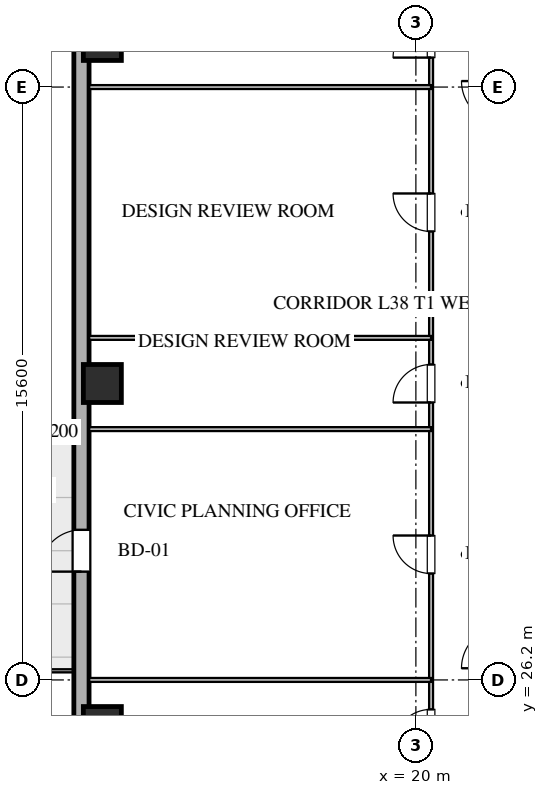
"""IFC4 building model, lengths in metres.
Left out: names, types, materials, properties, quantities, classifications, styles, units other than length and angle.
Written with IfcOpenShell. Run it as: python <this file> out.ifc"""

import sys

from ifc_helpers import new_model, si_unit, direction, frame, frame_2d, origin, origin_2d, place, context, subcontext, project, spatial, rectangle, hollow_rectangle, extrude, element, fill, save


model = new_model("IFC4")
c1 = context("Model", 3, precision=1e-05, world=origin(), true_north=direction((0.0, 1.0)))
c2 = subcontext(c1, "Body", "Model", "MODEL_VIEW")
j1 = project(units=[si_unit("LENGTHUNIT", "METRE"), si_unit("PLANEANGLEUNIT", "RADIAN")], contexts=[c1])
p1 = place(None, origin())
s1 = spatial("IfcSite", under=j1, at=p1, CompositionType="ELEMENT")
p2 = place(p1, origin())
s2 = spatial("IfcBuilding", under=s1, at=p2, CompositionType="ELEMENT")
p3 = place(p2, frame((0.0, 0.0, 146.05)))
s3 = spatial("IfcBuildingStorey", under=s2, at=p3, CompositionType="ELEMENT", Elevation=146.05)
for number, where, z_axis, x_axis in (
    (1, (11.75, 25.0, 0.0), (0.0, 0.0, 1.0), (1.0, 0.0, 0.0)),
    (2, (11.75, 34.0, 0.0), (0.0, 0.0, 1.0), (1.0, 0.0, 0.0)),
    (3, (11.75, 43.0, 0.0), (0.0, 0.0, 1.0), (1.0, 0.0, 0.0)),
):
    element("IfcColumn", number, at=place(p3, frame(where, z_axis=z_axis, x_axis=x_axis)), inside=s3, PredefinedType="COLUMN", context=c2, shape_type="SweptSolid", body=[
        extrude(hollow_rectangle(XDim=1.0, YDim=1.0, WallThickness=0.036, at=origin_2d()), origin(), (0.0, 0.0, 1.0), 3.451),
    ])
p4 = place(p3, frame((11.2, 9.0, 0.0), z_axis=(0.0, 0.0, 1.0), x_axis=(0.0, 1.0, 0.0)))
e4 = element("IfcWall", 4, at=p4, inside=s3, PredefinedType="SOLIDWALL", context=c2, shape_type="SweptSolid", body=[
    extrude(rectangle(XDim=50.0, YDim=0.4, at=frame_2d((25.0, 0.0))), origin(), (0.0, 0.0, 1.0), 2.61),
])
p5 = place(p4, frame((20.05, 0.0, 0.0)))
e5 = element("IfcOpeningElement", 5, at=p5, cuts=e4, PredefinedType="OPENING", context=c2, shape_type="SweptSolid", body=[
    extrude(rectangle(XDim=1.1, YDim=2.15, at=frame_2d((0.55, 1.075))), frame((0.0, 0.21, 0.0), z_axis=(0.0, -1.0, 0.0), x_axis=(1.0, 0.0, 0.0)), (0.0, 0.0, 1.0), 0.42),
])
p6 = place(p3, frame((20.4, 23.65, 0.0), z_axis=(0.0, 0.0, 1.0), x_axis=(0.0, 1.0, 0.0)))
e6 = element("IfcWall", 6, at=p6, inside=s3, PredefinedType="MOVABLE", context=c2, shape_type="SweptSolid", body=[
    extrude(rectangle(XDim=20.7, YDim=0.1, at=frame_2d((10.35, 0.0))), origin(), (0.0, 0.0, 1.0), 3.175),
])
p7 = place(p6, frame((0.775, 0.0, 0.0)))
e7 = element("IfcOpeningElement", 7, at=p7, cuts=e6, PredefinedType="OPENING", context=c2, shape_type="SweptSolid", body=[
    extrude(rectangle(XDim=1.0, YDim=2.05, at=frame_2d((0.5, 1.025))), frame((0.0, 0.06, 0.0), z_axis=(0.0, -1.0, 0.0), x_axis=(1.0, 0.0, 0.0)), (0.0, 0.0, 1.0), 0.12),
])
p8 = place(p6, frame((5.35, 0.0, 0.0)))
e8 = element("IfcOpeningElement", 8, at=p8, cuts=e6, PredefinedType="OPENING", context=c2, shape_type="SweptSolid", body=[
    extrude(rectangle(XDim=1.0, YDim=2.05, at=frame_2d((0.5, 1.025))), frame((0.0, 0.06, 0.0), z_axis=(0.0, -1.0, 0.0), x_axis=(1.0, 0.0, 0.0)), (0.0, 0.0, 1.0), 0.12),
])
p9 = place(p6, frame((9.85, 0.0, 0.0)))
e9 = element("IfcOpeningElement", 9, at=p9, cuts=e6, PredefinedType="OPENING", context=c2, shape_type="SweptSolid", body=[
    extrude(rectangle(XDim=1.0, YDim=2.05, at=frame_2d((0.5, 1.025))), frame((0.0, 0.06, 0.0), z_axis=(0.0, -1.0, 0.0), x_axis=(1.0, 0.0, 0.0)), (0.0, 0.0, 1.0), 0.12),
])
p10 = place(p6, frame((14.35, 0.0, 0.0)))
e10 = element("IfcOpeningElement", 10, at=p10, cuts=e6, PredefinedType="OPENING", context=c2, shape_type="SweptSolid", body=[
    extrude(rectangle(XDim=1.0, YDim=2.05, at=frame_2d((0.5, 1.025))), frame((0.0, 0.06, 0.0), z_axis=(0.0, -1.0, 0.0), x_axis=(1.0, 0.0, 0.0)), (0.0, 0.0, 1.0), 0.12),
])
p11 = place(p6, frame((18.925, 0.0, 0.0)))
e11 = element("IfcOpeningElement", 11, at=p11, cuts=e6, PredefinedType="OPENING", context=c2, shape_type="SweptSolid", body=[
    extrude(rectangle(XDim=1.0, YDim=2.05, at=frame_2d((0.5, 1.025))), frame((0.0, 0.06, 0.0), z_axis=(0.0, -1.0, 0.0), x_axis=(1.0, 0.0, 0.0)), (0.0, 0.0, 1.0), 0.12),
])
for number, where, z_axis, x_axis in (
    (12, (11.4, 26.2, 0.0), (0.0, 0.0, 1.0), (1.0, 0.0, 0.0)),
    (13, (11.4, 32.8, 0.0), (0.0, 0.0, 1.0), (1.0, 0.0, 0.0)),
    (14, (11.4, 35.2, 0.0), (0.0, 0.0, 1.0), (1.0, 0.0, 0.0)),
    (15, (11.4, 41.8, 0.0), (0.0, 0.0, 1.0), (1.0, 0.0, 0.0)),
):
    element("IfcWall", number, at=place(p3, frame(where, z_axis=z_axis, x_axis=x_axis)), inside=s3, PredefinedType="MOVABLE", context=c2, shape_type="SweptSolid", body=[
        extrude(rectangle(XDim=9.0, YDim=0.1, at=frame_2d((4.5, 0.0))), origin(), (0.0, 0.0, 1.0), 3.175),
    ])
p12 = place(p5, origin())
e16 = element("IfcDoor", 16, at=p12, inside=s3, OperationType="SINGLE_SWING_LEFT", PredefinedType="DOOR", context=c2, shape_type="SweptSolid", body=[
    extrude(rectangle(XDim=1.1, YDim=2.15, at=frame_2d((0.55, 1.075))), frame((0.0, 0.025, 0.0), z_axis=(0.0, -1.0, 0.0), x_axis=(1.0, 0.0, 0.0)), (0.0, 0.0, 1.0), 0.05),
])
fill(e5, e16)
p13 = place(p7, origin())
e17 = element("IfcDoor", 17, at=p13, inside=s3, OperationType="SINGLE_SWING_LEFT", PredefinedType="DOOR", context=c2, shape_type="SweptSolid", body=[
    extrude(rectangle(XDim=1.0, YDim=2.05, at=frame_2d((0.5, 1.025))), frame((0.0, 0.025, 0.0), z_axis=(0.0, -1.0, 0.0), x_axis=(1.0, 0.0, 0.0)), (0.0, 0.0, 1.0), 0.05),
])
fill(e7, e17)
p14 = place(p8, origin())
e18 = element("IfcDoor", 18, at=p14, inside=s3, OperationType="SINGLE_SWING_RIGHT", PredefinedType="DOOR", context=c2, shape_type="SweptSolid", body=[
    extrude(rectangle(XDim=1.0, YDim=2.05, at=frame_2d((0.5, 1.025))), frame((0.0, 0.025, 0.0), z_axis=(0.0, -1.0, 0.0), x_axis=(1.0, 0.0, 0.0)), (0.0, 0.0, 1.0), 0.05),
])
fill(e8, e18)
p15 = place(p9, origin())
e19 = element("IfcDoor", 19, at=p15, inside=s3, OperationType="SINGLE_SWING_LEFT", PredefinedType="DOOR", context=c2, shape_type="SweptSolid", body=[
    extrude(rectangle(XDim=1.0, YDim=2.05, at=frame_2d((0.5, 1.025))), frame((0.0, 0.025, 0.0), z_axis=(0.0, -1.0, 0.0), x_axis=(1.0, 0.0, 0.0)), (0.0, 0.0, 1.0), 0.05),
])
fill(e9, e19)
p16 = place(p10, origin())
e20 = element("IfcDoor", 20, at=p16, inside=s3, OperationType="SINGLE_SWING_RIGHT", PredefinedType="DOOR", context=c2, shape_type="SweptSolid", body=[
    extrude(rectangle(XDim=1.0, YDim=2.05, at=frame_2d((0.5, 1.025))), frame((0.0, 0.025, 0.0), z_axis=(0.0, -1.0, 0.0), x_axis=(1.0, 0.0, 0.0)), (0.0, 0.0, 1.0), 0.05),
])
fill(e10, e20)
p17 = place(p11, origin())
e21 = element("IfcDoor", 21, at=p17, inside=s3, OperationType="SINGLE_SWING_LEFT", PredefinedType="DOOR", context=c2, shape_type="SweptSolid", body=[
    extrude(rectangle(XDim=1.0, YDim=2.05, at=frame_2d((0.5, 1.025))), frame((0.0, 0.025, 0.0), z_axis=(0.0, -1.0, 0.0), x_axis=(1.0, 0.0, 0.0)), (0.0, 0.0, 1.0), 0.05),
])
fill(e11, e21)
save(model, sys.argv[1])
